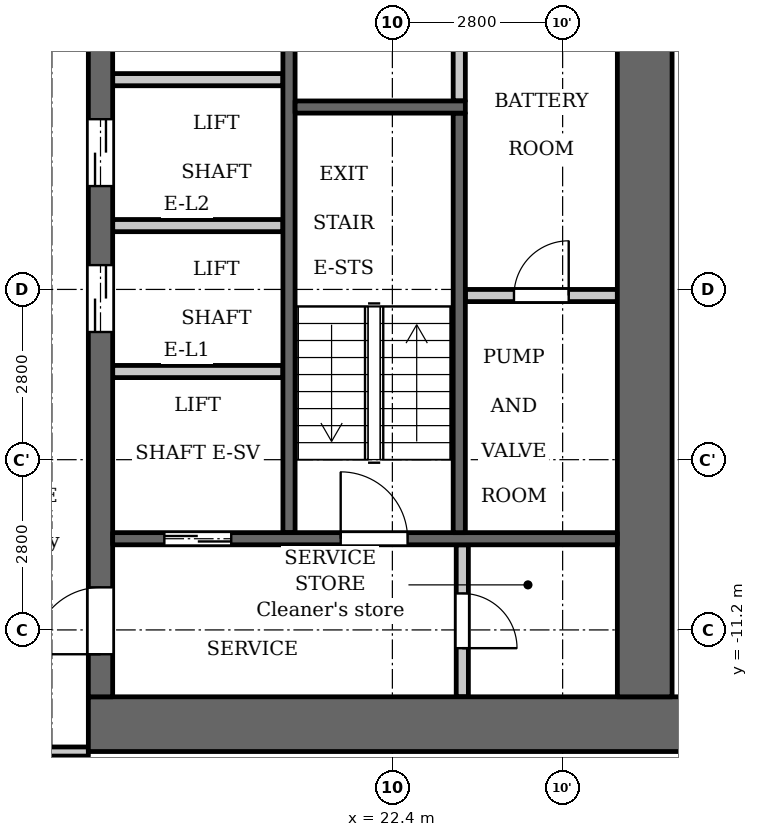
"""IFC4 building model, lengths in metres.
Left out: names, types, materials, properties, quantities, classifications, styles, units other than length and angle.
Written with IfcOpenShell. Run it as: python <this file> out.ifc"""

import sys

from ifc_helpers import new_model, si_unit, direction, frame, frame_2d, origin, place, context, subcontext, project, spatial, rectangle, extrude, element, fill, save


model = new_model("IFC4")
c1 = context("Model", 3, precision=1e-05, world=origin(), true_north=direction((0.0, 1.0)))
c2 = subcontext(c1, "Body", "Model", "MODEL_VIEW")
j1 = project(units=[si_unit("LENGTHUNIT", "METRE"), si_unit("PLANEANGLEUNIT", "RADIAN")], contexts=[c1])
p1 = place(None, origin())
s1 = spatial("IfcSite", under=j1, at=p1, CompositionType="ELEMENT")
p2 = place(p1, origin())
s2 = spatial("IfcBuilding", under=s1, at=p2, CompositionType="ELEMENT")
p3 = place(p2, frame((0.0, 0.0, 100.8)))
s3 = spatial("IfcBuildingStorey", under=s2, at=p3, CompositionType="ELEMENT", Elevation=100.8)
p4 = place(p3, frame((23.5, -2.5, 0.0), z_axis=(0.0, 0.0, 1.0), x_axis=(0.0, 1.0, 0.0)))
e1 = element("IfcWall", 1, at=p4, inside=s3, PredefinedType="PARTITIONING", context=c2, shape_type="SweptSolid", body=[
    extrude(rectangle(XDim=2.65, YDim=0.2, at=frame_2d((1.325, 0.0))), origin(), (0.0, 0.0, 1.0), 3.2),
])
p5 = place(p3, frame((20.7, -9.6, 0.0), z_axis=(0.0, 0.0, 1.0), x_axis=(0.0, 1.0, 0.0)))
e2 = element("IfcWall", 2, at=p5, inside=s3, PredefinedType="SHEAR", context=c2, shape_type="SweptSolid", body=[
    extrude(rectangle(XDim=9.75, YDim=0.2, at=frame_2d((4.875, 0.0))), origin(), (0.0, 0.0, 1.0), 3.2),
])
p6 = place(p3, frame((17.4, -12.75, 0.0), z_axis=(0.0, 0.0, 1.0), x_axis=(1.0, 0.0, 0.0)))
e3 = element("IfcWall", 3, at=p6, inside=s3, PredefinedType="SHEAR", context=c2, shape_type="SweptSolid", body=[
    extrude(rectangle(XDim=10.4, YDim=0.9, at=frame_2d((5.2, 0.0))), origin(), (0.0, 0.0, 1.0), 3.2),
])
p7 = place(p3, frame((17.6, -12.3, 0.0), z_axis=(0.0, 0.0, 1.0), x_axis=(0.0, 1.0, 0.0)))
e4 = element("IfcWall", 4, at=p7, inside=s3, PredefinedType="SHEAR", context=c2, shape_type="SweptSolid", body=[
    extrude(rectangle(XDim=24.6, YDim=0.4, at=frame_2d((12.3, 0.0))), origin(), (0.0, 0.0, 1.0), 3.2),
])
p8 = place(p7, frame((6.0, 0.0, 0.0)))
e5 = element("IfcOpeningElement", 5, at=p8, cuts=e4, PredefinedType="OPENING", context=c2, shape_type="SweptSolid", body=[
    extrude(rectangle(XDim=1.1, YDim=2.1, at=frame_2d((0.55, 1.05))), frame((0.0, 0.21, 0.0), z_axis=(0.0, -1.0, 0.0), x_axis=(1.0, 0.0, 0.0)), (0.0, 0.0, 1.0), 0.42),
])
p9 = place(p7, frame((8.4, 0.0, 0.0)))
e6 = element("IfcOpeningElement", 6, at=p9, cuts=e4, PredefinedType="OPENING", context=c2, shape_type="SweptSolid", body=[
    extrude(rectangle(XDim=1.1, YDim=2.1, at=frame_2d((0.55, 1.05))), frame((0.0, 0.21, 0.0), z_axis=(0.0, -1.0, 0.0), x_axis=(1.0, 0.0, 0.0)), (0.0, 0.0, 1.0), 0.42),
])
p10 = place(p7, frame((10.8, 0.0, 0.0)))
e7 = element("IfcOpeningElement", 7, at=p10, cuts=e4, PredefinedType="OPENING", context=c2, shape_type="SweptSolid", body=[
    extrude(rectangle(XDim=1.1, YDim=2.1, at=frame_2d((0.55, 1.05))), frame((0.0, 0.21, 0.0), z_axis=(0.0, -1.0, 0.0), x_axis=(1.0, 0.0, 0.0)), (0.0, 0.0, 1.0), 0.42),
])
p11 = place(p7, frame((16.75, 0.0, 0.0)))
e8 = element("IfcOpeningElement", 8, at=p11, cuts=e4, PredefinedType="OPENING", context=c2, shape_type="SweptSolid", body=[
    extrude(rectangle(XDim=0.9, YDim=2.1, at=frame_2d((0.45, 1.05))), frame((0.0, 0.21, 0.0), z_axis=(0.0, -1.0, 0.0), x_axis=(1.0, 0.0, 0.0)), (0.0, 0.0, 1.0), 0.42),
])
p12 = place(p7, frame((22.8, 0.0, 0.0)))
e9 = element("IfcOpeningElement", 9, at=p12, cuts=e4, PredefinedType="OPENING", context=c2, shape_type="SweptSolid", body=[
    extrude(rectangle(XDim=1.1, YDim=2.1, at=frame_2d((0.55, 1.05))), frame((0.0, 0.21, 0.0), z_axis=(0.0, -1.0, 0.0), x_axis=(1.0, 0.0, 0.0)), (0.0, 0.0, 1.0), 0.42),
])
p13 = place(p7, frame((0.7, 0.0, 0.0)))
e10 = element("IfcOpeningElement", 10, at=p13, cuts=e4, PredefinedType="OPENING", context=c2, shape_type="SweptSolid", body=[
    extrude(rectangle(XDim=1.1, YDim=2.1, at=frame_2d((0.55, 1.05))), frame((0.0, 0.21, 0.0), z_axis=(0.0, -1.0, 0.0), x_axis=(1.0, 0.0, 0.0)), (0.0, 0.0, 1.0), 0.42),
])
p14 = place(p7, frame((12.775, 0.0, 0.0)))
e11 = element("IfcOpeningElement", 11, at=p14, cuts=e4, PredefinedType="OPENING", context=c2, shape_type="SweptSolid", body=[
    extrude(rectangle(XDim=1.8, YDim=2.1, at=frame_2d((0.9, 1.05))), frame((0.0, 0.21, 0.0), z_axis=(0.0, -1.0, 0.0), x_axis=(1.0, 0.0, 0.0)), (0.0, 0.0, 1.0), 0.42),
])
p15 = place(p3, frame((26.55, -12.3, 0.0), z_axis=(0.0, 0.0, 1.0), x_axis=(0.0, 1.0, 0.0)))
e12 = element("IfcWall", 12, at=p15, inside=s3, PredefinedType="SHEAR", context=c2, shape_type="SweptSolid", body=[
    extrude(rectangle(XDim=24.6, YDim=0.9, at=frame_2d((12.3, 0.0))), origin(), (0.0, 0.0, 1.0), 3.2),
])
p16 = place(p3, frame((23.55, -12.3, 0.0), z_axis=(0.0, 0.0, 1.0), x_axis=(0.0, 1.0, 0.0)))
e13 = element("IfcWall", 13, at=p16, inside=s3, PredefinedType="PARTITIONING", context=c2, shape_type="SweptSolid", body=[
    extrude(rectangle(XDim=2.5, YDim=0.2, at=frame_2d((1.25, 0.0))), origin(), (0.0, 0.0, 1.0), 3.2),
])
p17 = place(p16, frame((0.8, 0.0, 0.0)))
e14 = element("IfcOpeningElement", 14, at=p17, cuts=e13, PredefinedType="OPENING", context=c2, shape_type="SweptSolid", body=[
    extrude(rectangle(XDim=0.9, YDim=2.1, at=frame_2d((0.45, 1.05))), frame((0.0, 0.11, 0.0), z_axis=(0.0, -1.0, 0.0), x_axis=(1.0, 0.0, 0.0)), (0.0, 0.0, 1.0), 0.22),
])
p18 = place(p3, frame((23.6, -5.7, 0.0), z_axis=(0.0, 0.0, 1.0), x_axis=(1.0, 0.0, 0.0)))
e15 = element("IfcWall", 15, at=p18, inside=s3, PredefinedType="PARTITIONING", context=c2, shape_type="SweptSolid", body=[
    extrude(rectangle(XDim=2.5, YDim=0.2, at=frame_2d((1.25, 0.0))), origin(), (0.0, 0.0, 1.0), 3.2),
])
p19 = place(p18, frame((0.8, 0.0, 0.0)))
e16 = element("IfcOpeningElement", 16, at=p19, cuts=e15, PredefinedType="OPENING", context=c2, shape_type="SweptSolid", body=[
    extrude(rectangle(XDim=0.9, YDim=2.1, at=frame_2d((0.45, 1.05))), frame((0.0, 0.11, 0.0), z_axis=(0.0, -1.0, 0.0), x_axis=(1.0, 0.0, 0.0)), (0.0, 0.0, 1.0), 0.22),
])
p20 = place(p3, frame((17.8, -9.7, 0.0), z_axis=(0.0, 0.0, 1.0), x_axis=(1.0, 0.0, 0.0)))
e17 = element("IfcWall", 17, at=p20, inside=s3, PredefinedType="SHEAR", context=c2, shape_type="SweptSolid", body=[
    extrude(rectangle(XDim=8.3, YDim=0.2, at=frame_2d((4.15, 0.0))), origin(), (0.0, 0.0, 1.0), 3.2),
])
p21 = place(p20, frame((0.85, 0.0, 0.0)))
e18 = element("IfcOpeningElement", 18, at=p21, cuts=e17, PredefinedType="OPENING", context=c2, shape_type="SweptSolid", body=[
    extrude(rectangle(XDim=1.1, YDim=2.1, at=frame_2d((0.55, 1.05))), frame((0.0, 0.11, 0.0), z_axis=(0.0, -1.0, 0.0), x_axis=(1.0, 0.0, 0.0)), (0.0, 0.0, 1.0), 0.22),
])
p22 = place(p20, frame((3.75, 0.0, 0.0)))
e19 = element("IfcOpeningElement", 19, at=p22, cuts=e17, PredefinedType="OPENING", context=c2, shape_type="SweptSolid", body=[
    extrude(rectangle(XDim=1.1, YDim=2.1, at=frame_2d((0.55, 1.05))), frame((0.0, 0.11, 0.0), z_axis=(0.0, -1.0, 0.0), x_axis=(1.0, 0.0, 0.0)), (0.0, 0.0, 1.0), 0.22),
])
for number, where, z_axis, x_axis in (
    (20, (17.8, -6.95, 0.0), (0.0, 0.0, 1.0), (1.0, 0.0, 0.0)),
    (21, (17.8, -4.55, 0.0), (0.0, 0.0, 1.0), (1.0, 0.0, 0.0)),
    (22, (17.8, -2.15, 0.0), (0.0, 0.0, 1.0), (1.0, 0.0, 0.0)),
):
    element("IfcWall", number, at=place(p3, frame(where, z_axis=z_axis, x_axis=x_axis)), inside=s3, PredefinedType="PARTITIONING", context=c2, shape_type="SweptSolid", body=[
        extrude(rectangle(XDim=2.8, YDim=0.2, at=frame_2d((1.4, 0.0))), origin(), (0.0, 0.0, 1.0), 3.2),
    ])
p23 = place(p3, frame((23.5, -9.6, 0.0), z_axis=(0.0, 0.0, 1.0), x_axis=(0.0, 1.0, 0.0)))
e23 = element("IfcWall", 23, at=p23, inside=s3, PredefinedType="SHEAR", context=c2, shape_type="SweptSolid", body=[
    extrude(rectangle(XDim=6.9, YDim=0.2, at=frame_2d((3.45, 0.0))), origin(), (0.0, 0.0, 1.0), 3.2),
])
p24 = place(p3, frame((20.8, -2.6, 0.0), z_axis=(0.0, 0.0, 1.0), x_axis=(1.0, 0.0, 0.0)))
e24 = element("IfcWall", 24, at=p24, inside=s3, PredefinedType="SHEAR", context=c2, shape_type="SweptSolid", body=[
    extrude(rectangle(XDim=2.8, YDim=0.2, at=frame_2d((1.4, 0.0))), origin(), (0.0, 0.0, 1.0), 3.2),
])
p25 = place(p3, frame((-17.4, -13.2, 0.0), z_axis=(0.0, 0.0, 1.0), x_axis=(1.0, 0.0, 0.0)))
e25 = element("IfcWall", 25, at=p25, inside=s3, PredefinedType="PARTITIONING", context=c2, shape_type="SweptSolid", body=[
    extrude(rectangle(XDim=34.8, YDim=0.15, at=frame_2d((17.4, 0.0))), origin(), (0.0, 0.0, 1.0), 3.2),
])
p26 = place(p25, frame((0.65, 0.0, 0.0)))
e26 = element("IfcOpeningElement", 26, at=p26, cuts=e25, PredefinedType="OPENING", context=c2, shape_type="SweptSolid", body=[
    extrude(rectangle(XDim=1.0, YDim=2.1, at=frame_2d((0.5, 1.05))), frame((0.0, 0.085, 0.0), z_axis=(0.0, -1.0, 0.0), x_axis=(1.0, 0.0, 0.0)), (0.0, 0.0, 1.0), 0.17),
])
p27 = place(p25, frame((33.05, 0.0, 0.0)))
e27 = element("IfcOpeningElement", 27, at=p27, cuts=e25, PredefinedType="OPENING", context=c2, shape_type="SweptSolid", body=[
    extrude(rectangle(XDim=1.0, YDim=2.1, at=frame_2d((0.5, 1.05))), frame((0.0, 0.085, 0.0), z_axis=(0.0, -1.0, 0.0), x_axis=(1.0, 0.0, 0.0)), (0.0, 0.0, 1.0), 0.17),
])
p28 = place(p25, frame((4.55, 0.0, 0.0)))
e28 = element("IfcOpeningElement", 28, at=p28, cuts=e25, PredefinedType="OPENING", context=c2, shape_type="SweptSolid", body=[
    extrude(rectangle(XDim=1.0, YDim=2.1, at=frame_2d((0.5, 1.05))), frame((0.0, 0.085, 0.0), z_axis=(0.0, -1.0, 0.0), x_axis=(1.0, 0.0, 0.0)), (0.0, 0.0, 1.0), 0.17),
])
p29 = place(p25, frame((21.35, 0.0, 0.0)))
e29 = element("IfcOpeningElement", 29, at=p29, cuts=e25, PredefinedType="OPENING", context=c2, shape_type="SweptSolid", body=[
    extrude(rectangle(XDim=1.0, YDim=2.1, at=frame_2d((0.5, 1.05))), frame((0.0, 0.085, 0.0), z_axis=(0.0, -1.0, 0.0), x_axis=(1.0, 0.0, 0.0)), (0.0, 0.0, 1.0), 0.17),
])
p30 = place(p25, frame((30.75, 0.0, 0.0)))
e30 = element("IfcOpeningElement", 30, at=p30, cuts=e25, PredefinedType="OPENING", context=c2, shape_type="SweptSolid", body=[
    extrude(rectangle(XDim=1.0, YDim=2.1, at=frame_2d((0.5, 1.05))), frame((0.0, 0.085, 0.0), z_axis=(0.0, -1.0, 0.0), x_axis=(1.0, 0.0, 0.0)), (0.0, 0.0, 1.0), 0.17),
])
p31 = place(p21, origin())
e31 = element("IfcDoor", 31, at=p31, inside=s3, OperationType="DOUBLE_DOOR_SLIDING", PredefinedType="DOOR", context=c2, shape_type="SweptSolid", body=[
    extrude(rectangle(XDim=1.1, YDim=2.1, at=frame_2d((0.55, 1.05))), frame((0.0, 0.025, 0.0), z_axis=(0.0, -1.0, 0.0), x_axis=(1.0, 0.0, 0.0)), (0.0, 0.0, 1.0), 0.05),
])
fill(e18, e31)
p32 = place(p8, origin())
e32 = element("IfcDoor", 32, at=p32, inside=s3, OperationType="DOUBLE_DOOR_SLIDING", PredefinedType="DOOR", context=c2, shape_type="SweptSolid", body=[
    extrude(rectangle(XDim=1.1, YDim=2.1, at=frame_2d((0.55, 1.05))), frame((0.0, 0.025, 0.0), z_axis=(0.0, -1.0, 0.0), x_axis=(1.0, 0.0, 0.0)), (0.0, 0.0, 1.0), 0.05),
])
fill(e5, e32)
p33 = place(p9, origin())
e33 = element("IfcDoor", 33, at=p33, inside=s3, OperationType="DOUBLE_DOOR_SLIDING", PredefinedType="DOOR", context=c2, shape_type="SweptSolid", body=[
    extrude(rectangle(XDim=1.1, YDim=2.1, at=frame_2d((0.55, 1.05))), frame((0.0, 0.025, 0.0), z_axis=(0.0, -1.0, 0.0), x_axis=(1.0, 0.0, 0.0)), (0.0, 0.0, 1.0), 0.05),
])
fill(e6, e33)
p34 = place(p13, origin())
e34 = element("IfcDoor", 34, at=p34, inside=s3, OperationType="SINGLE_SWING_RIGHT", PredefinedType="DOOR", context=c2, shape_type="SweptSolid", body=[
    extrude(rectangle(XDim=1.1, YDim=2.1, at=frame_2d((0.55, 1.05))), frame((0.0, 0.025, 0.0), z_axis=(0.0, -1.0, 0.0), x_axis=(1.0, 0.0, 0.0)), (0.0, 0.0, 1.0), 0.05),
])
fill(e10, e34)
p35 = place(p17, origin())
e35 = element("IfcDoor", 35, at=p35, inside=s3, OperationType="SINGLE_SWING_LEFT", PredefinedType="DOOR", context=c2, shape_type="SweptSolid", body=[
    extrude(rectangle(XDim=0.9, YDim=2.1, at=frame_2d((0.45, 1.05))), frame((0.0, 0.025, 0.0), z_axis=(0.0, -1.0, 0.0), x_axis=(1.0, 0.0, 0.0)), (0.0, 0.0, 1.0), 0.05),
])
fill(e14, e35)
p36 = place(p22, origin())
e36 = element("IfcDoor", 36, at=p36, inside=s3, OperationType="SINGLE_SWING_RIGHT", PredefinedType="DOOR", context=c2, shape_type="SweptSolid", body=[
    extrude(rectangle(XDim=1.1, YDim=2.1, at=frame_2d((0.55, 1.05))), frame((0.0, 0.025, 0.0), z_axis=(0.0, -1.0, 0.0), x_axis=(1.0, 0.0, 0.0)), (0.0, 0.0, 1.0), 0.05),
])
fill(e19, e36)
p37 = place(p19, origin())
e37 = element("IfcDoor", 37, at=p37, inside=s3, OperationType="SINGLE_SWING_LEFT", PredefinedType="DOOR", context=c2, shape_type="SweptSolid", body=[
    extrude(rectangle(XDim=0.9, YDim=2.1, at=frame_2d((0.45, 1.05))), frame((0.0, 0.025, 0.0), z_axis=(0.0, -1.0, 0.0), x_axis=(1.0, 0.0, 0.0)), (0.0, 0.0, 1.0), 0.05),
])
fill(e16, e37)
save(model, sys.argv[1])
